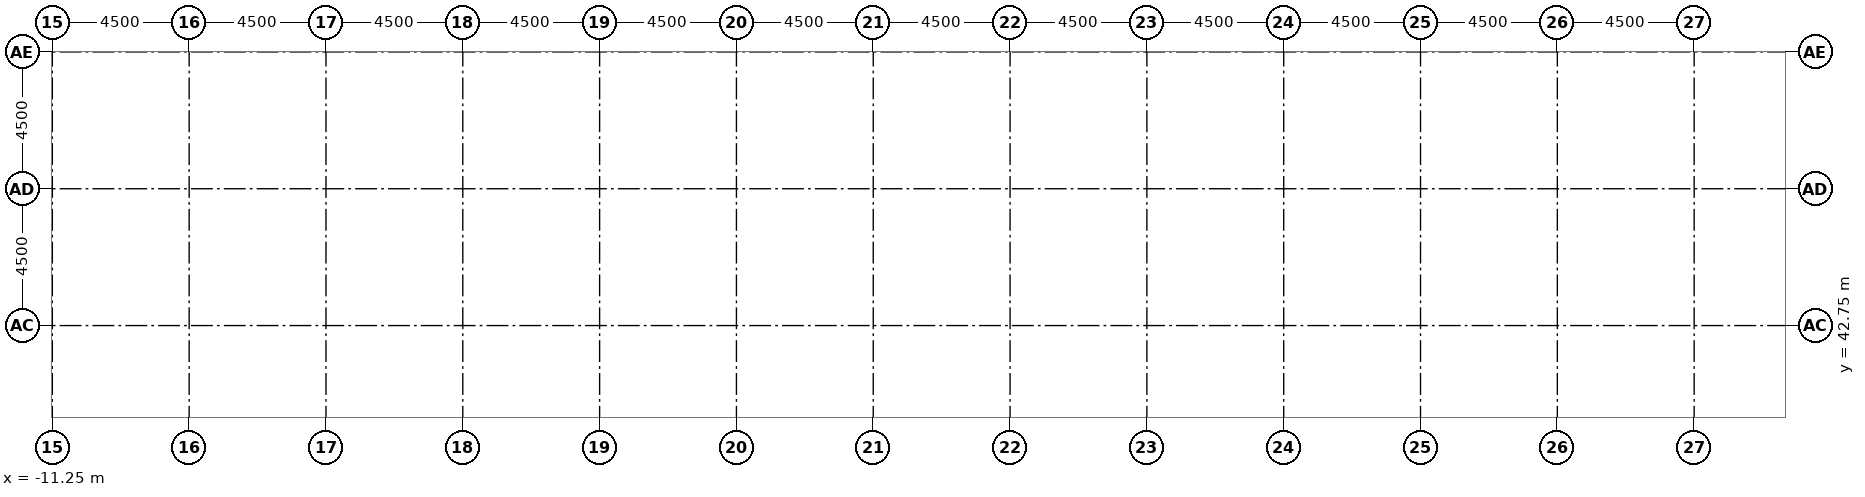
"""IFC4 building model, lengths in metres.
Left out: names, types, materials, properties, quantities, classifications, styles, units other than length and angle.
Written with IfcOpenShell. Run it as: python <this file> out.ifc"""

import sys

from ifc_helpers import new_model, si_unit, direction, frame, origin, origin_2d, place, context, subcontext, project, spatial, rectangle, extrude, element, save


model = new_model("IFC4")
c1 = context("Model", 3, precision=1e-05, world=origin(), true_north=direction((0.0, 1.0)))
c2 = subcontext(c1, "Body", "Model", "MODEL_VIEW")
j1 = project(units=[si_unit("LENGTHUNIT", "METRE"), si_unit("PLANEANGLEUNIT", "RADIAN")], contexts=[c1])
p1 = place(None, origin())
s1 = spatial("IfcSite", under=j1, at=p1, CompositionType="ELEMENT")
p2 = place(p1, origin())
s2 = spatial("IfcBuilding", under=s1, at=p2, CompositionType="ELEMENT")
p3 = place(p2, frame((0.0, 0.0, -4.0)))
s3 = spatial("IfcBuildingStorey", under=s2, at=p3, CompositionType="ELEMENT", Elevation=-4.0)
for number, where, z_axis, x_axis in (
    (1, (-4.5, 46.5, 0.0), (0.0, 0.0, 1.0), (1.0, 0.0, 0.0)),
    (2, (4.5, 46.5, 0.0), (0.0, 0.0, 1.0), (1.0, 0.0, 0.0)),
    (3, (13.5, 46.5, 0.0), (0.0, 0.0, 1.0), (1.0, 0.0, 0.0)),
    (4, (22.5, 46.5, 0.0), (0.0, 0.0, 1.0), (1.0, 0.0, 0.0)),
    (5, (31.5, 46.5, 0.0), (0.0, 0.0, 1.0), (1.0, 0.0, 0.0)),
    (6, (40.5, 46.5, 0.0), (0.0, 0.0, 1.0), (1.0, 0.0, 0.0)),
):
    element("IfcColumn", number, at=place(p3, frame(where, z_axis=z_axis, x_axis=x_axis)), inside=s3, PredefinedType="COLUMN", context=c2, shape_type="SweptSolid", body=[
        extrude(rectangle(XDim=1.2, YDim=1.2, at=origin_2d()), origin(), (0.0, 0.0, 1.0), 3.1),
    ])
save(model, sys.argv[1])
